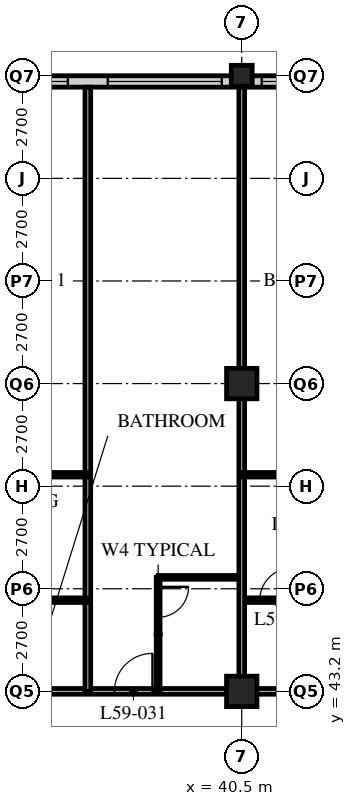
"""IFC4 building model, lengths in metres.
Left out: names, types, materials, properties, quantities, classifications, styles, units other than length and angle.
Written with IfcOpenShell. Run it as: python <this file> out.ifc"""

import sys

from ifc_helpers import new_model, si_unit, direction, frame, frame_2d, origin, origin_2d, place, context, subcontext, project, spatial, rectangle, hollow_rectangle, extrude, element, fill, save


model = new_model("IFC4")
c1 = context("Model", 3, precision=1e-05, world=origin(), true_north=direction((0.0, 1.0)))
c2 = subcontext(c1, "Body", "Model", "MODEL_VIEW")
j1 = project(units=[si_unit("LENGTHUNIT", "METRE"), si_unit("PLANEANGLEUNIT", "RADIAN")], contexts=[c1])
p1 = place(None, origin())
s1 = spatial("IfcSite", under=j1, at=p1, CompositionType="ELEMENT")
p2 = place(p1, origin())
s2 = spatial("IfcBuilding", under=s1, at=p2, CompositionType="ELEMENT")
p3 = place(p2, frame((0.0, 0.0, 228.0)))
s3 = spatial("IfcBuildingStorey", under=s2, at=p3, CompositionType="ELEMENT", Elevation=228.0)
for number, where, z_axis, x_axis in (
    (1, (40.5, 43.2, 0.0), (0.0, 0.0, 1.0), (1.0, 0.0, 0.0)),
    (2, (40.5, 51.3, 0.0), (0.0, 0.0, 1.0), (1.0, 0.0, 0.0)),
):
    element("IfcColumn", number, at=place(p3, frame(where, z_axis=z_axis, x_axis=x_axis)), inside=s3, PredefinedType="COLUMN", context=c2, shape_type="SweptSolid", body=[
        extrude(hollow_rectangle(XDim=0.8, YDim=0.8, WallThickness=0.08, at=origin_2d()), origin(), (0.0, 0.0, 1.0), 3.6),
    ])
p4 = place(p3, frame((40.5, 59.4, 0.0), z_axis=(0.0, 0.0, 1.0), x_axis=(1.0, 0.0, 0.0)))
e3 = element("IfcColumn", 3, at=p4, inside=s3, PredefinedType="COLUMN", context=c2, shape_type="SweptSolid", body=[
    extrude(hollow_rectangle(XDim=0.55, YDim=0.55, WallThickness=0.045, at=origin_2d()), origin(), (0.0, 0.0, 1.0), 3.6),
])
p5 = place(p3, frame((48.3, 59.25, 0.0), z_axis=(0.0, 0.0, 1.0), x_axis=(-1.0, 0.0, 0.0)))
e4 = element("IfcWall", 4, at=p5, inside=s3, PredefinedType="SOLIDWALL", context=c2, shape_type="SweptSolid", body=[
    extrude(rectangle(XDim=40.2, YDim=0.3, at=frame_2d((20.1, 0.0))), origin(), (0.0, 0.0, 1.0), 3.39),
])
p6 = place(p5, frame((0.225, 0.0, 0.6)))
e5 = element("IfcOpeningElement", 5, at=p6, cuts=e4, PredefinedType="OPENING", context=c2, shape_type="SweptSolid", body=[
    extrude(rectangle(XDim=3.0, YDim=2.0, at=frame_2d((1.5, 1.0))), frame((0.0, 0.16, 0.0), z_axis=(0.0, -1.0, 0.0), x_axis=(1.0, 0.0, 0.0)), (0.0, 0.0, 1.0), 0.32),
])
p7 = place(p5, frame((4.275, 0.0, 0.6)))
e6 = element("IfcOpeningElement", 6, at=p7, cuts=e4, PredefinedType="OPENING", context=c2, shape_type="SweptSolid", body=[
    extrude(rectangle(XDim=3.0, YDim=2.0, at=frame_2d((1.5, 1.0))), frame((0.0, 0.16, 0.0), z_axis=(0.0, -1.0, 0.0), x_axis=(1.0, 0.0, 0.0)), (0.0, 0.0, 1.0), 0.32),
])
p8 = place(p5, frame((8.325, 0.0, 0.6)))
e7 = element("IfcOpeningElement", 7, at=p8, cuts=e4, PredefinedType="OPENING", context=c2, shape_type="SweptSolid", body=[
    extrude(rectangle(XDim=3.0, YDim=2.0, at=frame_2d((1.5, 1.0))), frame((0.0, 0.16, 0.0), z_axis=(0.0, -1.0, 0.0), x_axis=(1.0, 0.0, 0.0)), (0.0, 0.0, 1.0), 0.32),
])
p9 = place(p5, frame((12.375, 0.0, 0.6)))
e8 = element("IfcOpeningElement", 8, at=p9, cuts=e4, PredefinedType="OPENING", context=c2, shape_type="SweptSolid", body=[
    extrude(rectangle(XDim=3.0, YDim=2.0, at=frame_2d((1.5, 1.0))), frame((0.0, 0.16, 0.0), z_axis=(0.0, -1.0, 0.0), x_axis=(1.0, 0.0, 0.0)), (0.0, 0.0, 1.0), 0.32),
])
p10 = place(p5, frame((16.425, 0.0, 0.6)))
e9 = element("IfcOpeningElement", 9, at=p10, cuts=e4, PredefinedType="OPENING", context=c2, shape_type="SweptSolid", body=[
    extrude(rectangle(XDim=3.0, YDim=2.0, at=frame_2d((1.5, 1.0))), frame((0.0, 0.16, 0.0), z_axis=(0.0, -1.0, 0.0), x_axis=(1.0, 0.0, 0.0)), (0.0, 0.0, 1.0), 0.32),
])
p11 = place(p5, frame((20.475, 0.0, 0.6)))
e10 = element("IfcOpeningElement", 10, at=p11, cuts=e4, PredefinedType="OPENING", context=c2, shape_type="SweptSolid", body=[
    extrude(rectangle(XDim=3.0, YDim=2.0, at=frame_2d((1.5, 1.0))), frame((0.0, 0.16, 0.0), z_axis=(0.0, -1.0, 0.0), x_axis=(1.0, 0.0, 0.0)), (0.0, 0.0, 1.0), 0.32),
])
p12 = place(p5, frame((24.525, 0.0, 0.6)))
e11 = element("IfcOpeningElement", 11, at=p12, cuts=e4, PredefinedType="OPENING", context=c2, shape_type="SweptSolid", body=[
    extrude(rectangle(XDim=3.0, YDim=2.0, at=frame_2d((1.5, 1.0))), frame((0.0, 0.16, 0.0), z_axis=(0.0, -1.0, 0.0), x_axis=(1.0, 0.0, 0.0)), (0.0, 0.0, 1.0), 0.32),
])
p13 = place(p5, frame((28.575, 0.0, 0.6)))
e12 = element("IfcOpeningElement", 12, at=p13, cuts=e4, PredefinedType="OPENING", context=c2, shape_type="SweptSolid", body=[
    extrude(rectangle(XDim=3.0, YDim=2.0, at=frame_2d((1.5, 1.0))), frame((0.0, 0.16, 0.0), z_axis=(0.0, -1.0, 0.0), x_axis=(1.0, 0.0, 0.0)), (0.0, 0.0, 1.0), 0.32),
])
p14 = place(p5, frame((32.625, 0.0, 0.6)))
e13 = element("IfcOpeningElement", 13, at=p14, cuts=e4, PredefinedType="OPENING", context=c2, shape_type="SweptSolid", body=[
    extrude(rectangle(XDim=3.0, YDim=2.0, at=frame_2d((1.5, 1.0))), frame((0.0, 0.16, 0.0), z_axis=(0.0, -1.0, 0.0), x_axis=(1.0, 0.0, 0.0)), (0.0, 0.0, 1.0), 0.32),
])
p15 = place(p5, frame((36.675, 0.0, 0.6)))
e14 = element("IfcOpeningElement", 14, at=p15, cuts=e4, PredefinedType="OPENING", context=c2, shape_type="SweptSolid", body=[
    extrude(rectangle(XDim=3.0, YDim=2.0, at=frame_2d((1.5, 1.0))), frame((0.0, 0.16, 0.0), z_axis=(0.0, -1.0, 0.0), x_axis=(1.0, 0.0, 0.0)), (0.0, 0.0, 1.0), 0.32),
])
p16 = place(p3, frame((8.1, 43.2, 0.0), z_axis=(0.0, 0.0, 1.0), x_axis=(1.0, 0.0, 0.0)))
e15 = element("IfcWall", 15, at=p16, inside=s3, PredefinedType="PARTITIONING", context=c2, shape_type="SweptSolid", body=[
    extrude(rectangle(XDim=36.45, YDim=0.15, at=frame_2d((18.225, 0.0))), origin(), (0.0, 0.0, 1.0), 2.628),
])
p17 = place(p16, frame((4.45, 0.0, 0.0)))
e16 = element("IfcOpeningElement", 16, at=p17, cuts=e15, PredefinedType="OPENING", context=c2, shape_type="SweptSolid", body=[
    extrude(rectangle(XDim=1.0, YDim=2.1, at=frame_2d((0.5, 1.05))), frame((0.0, 0.085, 0.0), z_axis=(0.0, -1.0, 0.0), x_axis=(1.0, 0.0, 0.0)), (0.0, 0.0, 1.0), 0.17),
])
p18 = place(p16, frame((17.1, 0.0, 0.0)))
e17 = element("IfcOpeningElement", 17, at=p18, cuts=e15, PredefinedType="OPENING", context=c2, shape_type="SweptSolid", body=[
    extrude(rectangle(XDim=1.0, YDim=2.1, at=frame_2d((0.5, 1.05))), frame((0.0, 0.085, 0.0), z_axis=(0.0, -1.0, 0.0), x_axis=(1.0, 0.0, 0.0)), (0.0, 0.0, 1.0), 0.17),
])
p19 = place(p16, frame((29.05, 0.0, 0.0)))
e18 = element("IfcOpeningElement", 18, at=p19, cuts=e15, PredefinedType="OPENING", context=c2, shape_type="SweptSolid", body=[
    extrude(rectangle(XDim=1.0, YDim=2.1, at=frame_2d((0.5, 1.05))), frame((0.0, 0.085, 0.0), z_axis=(0.0, -1.0, 0.0), x_axis=(1.0, 0.0, 0.0)), (0.0, 0.0, 1.0), 0.17),
])
p20 = place(p16, frame((33.925, 0.0, 0.0)))
e19 = element("IfcOpeningElement", 19, at=p20, cuts=e15, PredefinedType="OPENING", context=c2, shape_type="SweptSolid", body=[
    extrude(rectangle(XDim=1.0, YDim=2.1, at=frame_2d((0.5, 1.05))), frame((0.0, 0.085, 0.0), z_axis=(0.0, -1.0, 0.0), x_axis=(1.0, 0.0, 0.0)), (0.0, 0.0, 1.0), 0.17),
])
p21 = place(p16, frame((1.525, 0.0, 0.0)))
e20 = element("IfcOpeningElement", 20, at=p21, cuts=e15, PredefinedType="OPENING", context=c2, shape_type="SweptSolid", body=[
    extrude(rectangle(XDim=1.0, YDim=2.1, at=frame_2d((0.5, 1.05))), frame((0.0, 0.085, 0.0), z_axis=(0.0, -1.0, 0.0), x_axis=(1.0, 0.0, 0.0)), (0.0, 0.0, 1.0), 0.17),
])
p22 = place(p3, frame((36.45, 43.2, 0.0), z_axis=(0.0, 0.0, 1.0), x_axis=(0.0, 1.0, 0.0)))
e21 = element("IfcWall", 21, at=p22, inside=s3, PredefinedType="PARTITIONING", context=c2, shape_type="SweptSolid", body=[
    extrude(rectangle(XDim=15.9, YDim=0.15, at=frame_2d((7.95, 0.0))), origin(), (0.0, 0.0, 1.0), 3.39),
])
p23 = place(p3, frame((38.3, 46.2, 0.0), z_axis=(0.0, 0.0, 1.0), x_axis=(1.0, 0.0, 0.0)))
e22 = element("IfcWall", 22, at=p23, inside=s3, PredefinedType="PARTITIONING", context=c2, shape_type="SweptSolid", body=[
    extrude(rectangle(XDim=2.2, YDim=0.1, at=frame_2d((1.1, 0.0))), origin(), (0.0, 0.0, 1.0), 3.39),
])
p24 = place(p3, frame((38.3, 43.2, 0.0), z_axis=(0.0, 0.0, 1.0), x_axis=(0.0, 1.0, 0.0)))
e23 = element("IfcWall", 23, at=p24, inside=s3, PredefinedType="PARTITIONING", context=c2, shape_type="SweptSolid", body=[
    extrude(rectangle(XDim=3.0, YDim=0.1, at=frame_2d((1.5, 0.0))), origin(), (0.0, 0.0, 1.0), 3.39),
])
p25 = place(p24, frame((1.95, 0.0, 0.0)))
e24 = element("IfcOpeningElement", 24, at=p25, cuts=e23, PredefinedType="OPENING", context=c2, shape_type="SweptSolid", body=[
    extrude(rectangle(XDim=0.8, YDim=2.1, at=frame_2d((0.4, 1.05))), frame((0.0, 0.06, 0.0), z_axis=(0.0, -1.0, 0.0), x_axis=(1.0, 0.0, 0.0)), (0.0, 0.0, 1.0), 0.12),
])
p26 = place(p3, frame((40.5, 45.6, 0.0), z_axis=(0.0, 0.0, 1.0), x_axis=(1.0, 0.0, 0.0)))
e25 = element("IfcWall", 25, at=p26, inside=s3, PredefinedType="PARTITIONING", context=c2, shape_type="SweptSolid", body=[
    extrude(rectangle(XDim=8.05, YDim=0.12, at=frame_2d((4.025, 0.0))), origin(), (0.0, 0.0, 1.0), 3.39),
])
p27 = place(p26, frame((0.475, 0.0, 0.0)))
e26 = element("IfcOpeningElement", 26, at=p27, cuts=e25, PredefinedType="OPENING", context=c2, shape_type="SweptSolid", body=[
    extrude(rectangle(XDim=0.85, YDim=2.1, at=frame_2d((0.425, 1.05))), frame((0.0, 0.07, 0.0), z_axis=(0.0, -1.0, 0.0), x_axis=(1.0, 0.0, 0.0)), (0.0, 0.0, 1.0), 0.14),
])
p28 = place(p26, frame((4.325, 0.0, 0.0)))
e27 = element("IfcOpeningElement", 27, at=p28, cuts=e25, PredefinedType="OPENING", context=c2, shape_type="SweptSolid", body=[
    extrude(rectangle(XDim=0.85, YDim=2.1, at=frame_2d((0.425, 1.05))), frame((0.0, 0.07, 0.0), z_axis=(0.0, -1.0, 0.0), x_axis=(1.0, 0.0, 0.0)), (0.0, 0.0, 1.0), 0.14),
])
p29 = place(p3, frame((40.5, 43.2, 0.0), z_axis=(0.0, 0.0, 1.0), x_axis=(0.0, 1.0, 0.0)))
e28 = element("IfcWall", 28, at=p29, inside=s3, PredefinedType="PARTITIONING", context=c2, shape_type="SweptSolid", body=[
    extrude(rectangle(XDim=15.9, YDim=0.15, at=frame_2d((7.95, 0.0))), origin(), (0.0, 0.0, 1.0), 2.628),
])
p30 = place(p3, frame((4.1, 45.6, 0.0), z_axis=(0.0, 0.0, 1.0), x_axis=(1.0, 0.0, 0.0)))
e29 = element("IfcWall", 29, at=p30, inside=s3, PredefinedType="PARTITIONING", context=c2, shape_type="SweptSolid", body=[
    extrude(rectangle(XDim=32.35, YDim=0.12, at=frame_2d((16.175, 0.0))), origin(), (0.0, 0.0, 1.0), 3.39),
])
p31 = place(p30, frame((9.025, 0.0, 0.0)))
e30 = element("IfcOpeningElement", 30, at=p31, cuts=e29, PredefinedType="OPENING", context=c2, shape_type="SweptSolid", body=[
    extrude(rectangle(XDim=0.85, YDim=2.1, at=frame_2d((0.425, 1.05))), frame((0.0, 0.07, 0.0), z_axis=(0.0, -1.0, 0.0), x_axis=(1.0, 0.0, 0.0)), (0.0, 0.0, 1.0), 0.14),
])
p32 = place(p30, frame((16.475, 0.0, 0.0)))
e31 = element("IfcOpeningElement", 31, at=p32, cuts=e29, PredefinedType="OPENING", context=c2, shape_type="SweptSolid", body=[
    extrude(rectangle(XDim=0.85, YDim=2.1, at=frame_2d((0.425, 1.05))), frame((0.0, 0.07, 0.0), z_axis=(0.0, -1.0, 0.0), x_axis=(1.0, 0.0, 0.0)), (0.0, 0.0, 1.0), 0.14),
])
p33 = place(p30, frame((21.175, 0.0, 0.0)))
e32 = element("IfcOpeningElement", 32, at=p33, cuts=e29, PredefinedType="OPENING", context=c2, shape_type="SweptSolid", body=[
    extrude(rectangle(XDim=0.85, YDim=2.1, at=frame_2d((0.425, 1.05))), frame((0.0, 0.07, 0.0), z_axis=(0.0, -1.0, 0.0), x_axis=(1.0, 0.0, 0.0)), (0.0, 0.0, 1.0), 0.14),
])
p34 = place(p30, frame((28.625, 0.0, 0.0)))
e33 = element("IfcOpeningElement", 33, at=p34, cuts=e29, PredefinedType="OPENING", context=c2, shape_type="SweptSolid", body=[
    extrude(rectangle(XDim=0.85, YDim=2.1, at=frame_2d((0.425, 1.05))), frame((0.0, 0.07, 0.0), z_axis=(0.0, -1.0, 0.0), x_axis=(1.0, 0.0, 0.0)), (0.0, 0.0, 1.0), 0.14),
])
p35 = place(p30, frame((6.725, 0.0, 0.0)))
e34 = element("IfcOpeningElement", 34, at=p35, cuts=e29, PredefinedType="OPENING", context=c2, shape_type="SweptSolid", body=[
    extrude(rectangle(XDim=0.85, YDim=2.1, at=frame_2d((0.425, 1.05))), frame((0.0, 0.07, 0.0), z_axis=(0.0, -1.0, 0.0), x_axis=(1.0, 0.0, 0.0)), (0.0, 0.0, 1.0), 0.14),
])
p36 = place(p30, frame((2.875, 0.0, 0.0)))
e35 = element("IfcOpeningElement", 35, at=p36, cuts=e29, PredefinedType="OPENING", context=c2, shape_type="SweptSolid", body=[
    extrude(rectangle(XDim=0.85, YDim=2.1, at=frame_2d((0.425, 1.05))), frame((0.0, 0.07, 0.0), z_axis=(0.0, -1.0, 0.0), x_axis=(1.0, 0.0, 0.0)), (0.0, 0.0, 1.0), 0.14),
])
p37 = place(p3, frame((32.4, 48.9, 0.0), z_axis=(0.0, 0.0, 1.0), x_axis=(1.0, 0.0, 0.0)))
e36 = element("IfcWall", 36, at=p37, inside=s3, PredefinedType="PARTITIONING", context=c2, shape_type="SweptSolid", body=[
    extrude(rectangle(XDim=4.05, YDim=0.12, at=frame_2d((2.025, 0.0))), origin(), (0.0, 0.0, 1.0), 3.39),
])
p38 = place(p37, frame((1.6, 0.0, 0.0)))
e37 = element("IfcOpeningElement", 37, at=p38, cuts=e36, PredefinedType="OPENING", context=c2, shape_type="SweptSolid", body=[
    extrude(rectangle(XDim=0.85, YDim=2.1, at=frame_2d((0.425, 1.05))), frame((0.0, 0.07, 0.0), z_axis=(0.0, -1.0, 0.0), x_axis=(1.0, 0.0, 0.0)), (0.0, 0.0, 1.0), 0.14),
])
p39 = place(p3, frame((40.5, 48.9, 0.0), z_axis=(0.0, 0.0, 1.0), x_axis=(1.0, 0.0, 0.0)))
e38 = element("IfcWall", 38, at=p39, inside=s3, PredefinedType="PARTITIONING", context=c2, shape_type="SweptSolid", body=[
    extrude(rectangle(XDim=4.05, YDim=0.12, at=frame_2d((2.025, 0.0))), origin(), (0.0, 0.0, 1.0), 3.39),
])
p40 = place(p39, frame((1.6, 0.0, 0.0)))
e39 = element("IfcOpeningElement", 39, at=p40, cuts=e38, PredefinedType="OPENING", context=c2, shape_type="SweptSolid", body=[
    extrude(rectangle(XDim=0.85, YDim=2.1, at=frame_2d((0.425, 1.05))), frame((0.0, 0.07, 0.0), z_axis=(0.0, -1.0, 0.0), x_axis=(1.0, 0.0, 0.0)), (0.0, 0.0, 1.0), 0.14),
])
p41 = place(p7, origin())
e40 = element("IfcWindow", 40, at=p41, inside=s3, PartitioningType="SINGLE_PANEL", PredefinedType="WINDOW", context=c2, shape_type="SweptSolid", body=[
    extrude(rectangle(XDim=3.0, YDim=2.0, at=frame_2d((1.5, 1.0))), frame((0.0, 0.03, 0.0), z_axis=(0.0, -1.0, 0.0), x_axis=(1.0, 0.0, 0.0)), (0.0, 0.0, 1.0), 0.06),
])
fill(e6, e40)
p42 = place(p8, origin())
e41 = element("IfcWindow", 41, at=p42, inside=s3, PartitioningType="SINGLE_PANEL", PredefinedType="WINDOW", context=c2, shape_type="SweptSolid", body=[
    extrude(rectangle(XDim=3.0, YDim=2.0, at=frame_2d((1.5, 1.0))), frame((0.0, 0.03, 0.0), z_axis=(0.0, -1.0, 0.0), x_axis=(1.0, 0.0, 0.0)), (0.0, 0.0, 1.0), 0.06),
])
fill(e7, e41)
p43 = place(p9, origin())
e42 = element("IfcWindow", 42, at=p43, inside=s3, PartitioningType="SINGLE_PANEL", PredefinedType="WINDOW", context=c2, shape_type="SweptSolid", body=[
    extrude(rectangle(XDim=3.0, YDim=2.0, at=frame_2d((1.5, 1.0))), frame((0.0, 0.03, 0.0), z_axis=(0.0, -1.0, 0.0), x_axis=(1.0, 0.0, 0.0)), (0.0, 0.0, 1.0), 0.06),
])
fill(e8, e42)
p44 = place(p25, origin())
e43 = element("IfcDoor", 43, at=p44, inside=s3, OperationType="SINGLE_SWING_LEFT", PredefinedType="DOOR", context=c2, shape_type="SweptSolid", body=[
    extrude(rectangle(XDim=0.8, YDim=2.1, at=frame_2d((0.4, 1.05))), frame((0.0, 0.025, 0.0), z_axis=(0.0, -1.0, 0.0), x_axis=(1.0, 0.0, 0.0)), (0.0, 0.0, 1.0), 0.05),
])
fill(e24, e43)
p45 = place(p19, origin())
e44 = element("IfcDoor", 44, at=p45, inside=s3, OperationType="SINGLE_SWING_RIGHT", PredefinedType="DOOR", context=c2, shape_type="SweptSolid", body=[
    extrude(rectangle(XDim=1.0, YDim=2.1, at=frame_2d((0.5, 1.05))), frame((0.0, 0.025, 0.0), z_axis=(0.0, -1.0, 0.0), x_axis=(1.0, 0.0, 0.0)), (0.0, 0.0, 1.0), 0.05),
])
fill(e18, e44)
p46 = place(p27, origin())
e45 = element("IfcDoor", 45, at=p46, inside=s3, OperationType="SINGLE_SWING_RIGHT", PredefinedType="DOOR", context=c2, shape_type="SweptSolid", body=[
    extrude(rectangle(XDim=0.85, YDim=2.1, at=frame_2d((0.425, 1.05))), frame((0.0, 0.025, 0.0), z_axis=(0.0, -1.0, 0.0), x_axis=(1.0, 0.0, 0.0)), (0.0, 0.0, 1.0), 0.05),
])
fill(e26, e45)
save(model, sys.argv[1])
